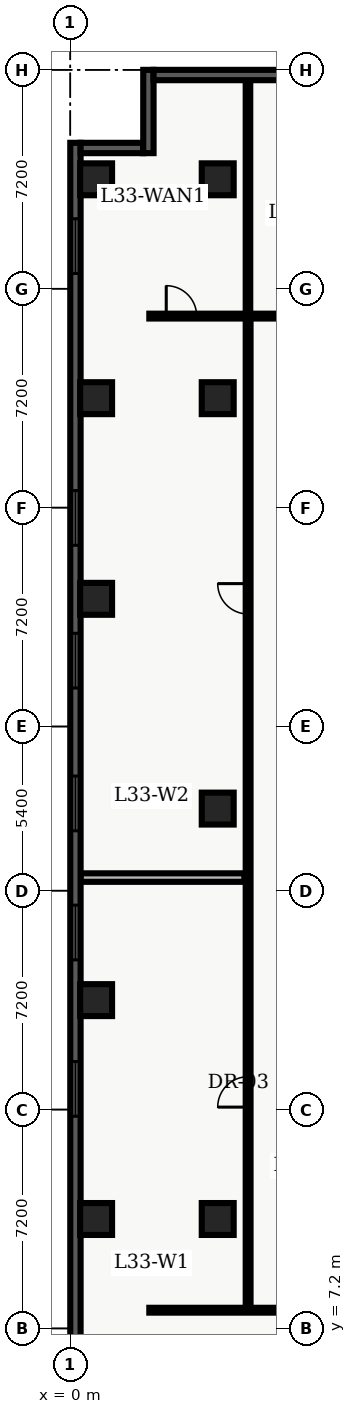
"""IFC4 building model, lengths in metres.
Left out: names, types, materials, properties, quantities, classifications, styles, units other than length and angle.
Written with IfcOpenShell. Run it as: python <this file> out.ifc"""

import sys

from ifc_helpers import new_model, entity, si_unit, converted_unit, direction, frame, origin_with_axes, origin_2d_with_axis, place, context, subcontext, project, spatial, polyline, rectangle, outline, extrude, element, fill, save


model = new_model("IFC4")
c1 = context("Model", 3, precision=1e-05, world=origin_with_axes(), true_north=direction((0.0, 1.0)))
c2 = subcontext(c1, "Body", "Model", "MODEL_VIEW")
j1 = project(units=[si_unit("LENGTHUNIT", "METRE"), converted_unit("PLANEANGLEUNIT", "DEGREE", entity("IfcPlaneAngleMeasure", 0.017), si_unit("PLANEANGLEUNIT", "RADIAN"), dimensions=[0, 0, 0, 0, 0, 0, 0])], contexts=[c1])
p1 = place(None, origin_with_axes())
s1 = spatial("IfcSite", under=j1, at=p1, CompositionType="ELEMENT")
p2 = place(p1, origin_with_axes())
s2 = spatial("IfcBuilding", under=s1, at=p2, CompositionType="ELEMENT")
p3 = place(p2, frame((0.0, 0.0, 136.8), z_axis=(0.0, 0.0, 1.0), x_axis=(1.0, 0.0, 0.0)))
s3 = spatial("IfcBuildingStorey", under=s2, at=p3, CompositionType="ELEMENT", Elevation=136.8)
for number, where, z_axis, x_axis in (
    (1, (4.85, 10.8, 0.0), (0.0, 0.0, 1.0), (1.0, 0.0, 0.0)),
    (2, (4.85, 24.3, 0.0), (0.0, 0.0, 1.0), (1.0, 0.0, 0.0)),
    (3, (4.85, 37.8, 0.0), (0.0, 0.0, 1.0), (1.0, 0.0, 0.0)),
    (4, (4.85, 45.0, 0.0), (0.0, 0.0, 1.0), (1.0, 0.0, 0.0)),
    (5, (0.85, 10.8, 0.0), (0.0, 0.0, 1.0), (1.0, 0.0, 0.0)),
    (6, (0.85, 18.0, 0.0), (0.0, 0.0, 1.0), (1.0, 0.0, 0.0)),
    (7, (0.85, 31.2, 0.0), (0.0, 0.0, 1.0), (1.0, 0.0, 0.0)),
    (8, (0.85, 37.8, 0.0), (0.0, 0.0, 1.0), (1.0, 0.0, 0.0)),
    (9, (0.85, 45.0, 0.0), (0.0, 0.0, 1.0), (1.0, 0.0, 0.0)),
):
    element("IfcColumn", number, at=place(p3, frame(where, z_axis=z_axis, x_axis=x_axis)), inside=s3, PredefinedType="COLUMN", context=c2, shape_type="SweptSolid", body=[
        extrude(rectangle(XDim=1.05, YDim=1.05, at=origin_2d_with_axis()), origin_with_axes(), (0.0, 0.0, 1.0), 3.9),
    ])
p4 = place(p3, frame((2.6, 7.8, 0.0), z_axis=(0.0, 0.0, 1.0), x_axis=(1.0, 0.0, 0.0)))
e10 = element("IfcWall", 10, at=p4, inside=s3, PredefinedType="PARTITIONING", context=c2, shape_type="SweptSolid", body=[
    extrude(outline(polyline([(0.0, -0.08), (18.55, -0.08), (18.55, 0.08), (0.0, 0.08), (0.0, -0.08)])), origin_with_axes(), (0.0, 0.0, 1.0), 2.7),
])
p5 = place(p4, frame((9.245, 0.0, 0.0), z_axis=(0.0, 0.0, 1.0), x_axis=(1.0, 0.0, 0.0)))
e11 = element("IfcOpeningElement", 11, at=p5, cuts=e10, PredefinedType="OPENING", context=c2, shape_type="SweptSolid", body=[
    extrude(rectangle(XDim=1.2, YDim=0.18, at=origin_2d_with_axis()), origin_with_axes(), (0.0, 0.0, 1.0), 2.2),
])
p6 = place(p3, frame((2.6, 40.5, 0.0), z_axis=(0.0, 0.0, 1.0), x_axis=(1.0, 0.0, 0.0)))
e12 = element("IfcWall", 12, at=p6, inside=s3, PredefinedType="PARTITIONING", context=c2, shape_type="SweptSolid", body=[
    extrude(outline(polyline([(0.0, -0.08), (18.89, -0.08), (18.89, 0.08), (0.0, 0.08), (0.0, -0.08)])), origin_with_axes(), (0.0, 0.0, 1.0), 2.7),
])
p7 = place(p6, frame((1.057, 0.0, 0.0), z_axis=(0.0, 0.0, 1.0), x_axis=(1.0, 0.0, 0.0)))
e13 = element("IfcOpeningElement", 13, at=p7, cuts=e12, PredefinedType="OPENING", context=c2, shape_type="SweptSolid", body=[
    extrude(rectangle(XDim=1.0, YDim=0.18, at=origin_2d_with_axis()), origin_with_axes(), (0.0, 0.0, 1.0), 2.15),
])
p8 = place(p6, frame((6.022, 0.0, 0.0), z_axis=(0.0, 0.0, 1.0), x_axis=(1.0, 0.0, 0.0)))
e14 = element("IfcOpeningElement", 14, at=p8, cuts=e12, PredefinedType="OPENING", context=c2, shape_type="SweptSolid", body=[
    extrude(rectangle(XDim=1.0, YDim=0.18, at=origin_2d_with_axis()), origin_with_axes(), (0.0, 0.0, 1.0), 2.15),
])
p9 = place(p6, frame((13.3, 0.0, 0.0), z_axis=(0.0, 0.0, 1.0), x_axis=(1.0, 0.0, 0.0)))
e15 = element("IfcOpeningElement", 15, at=p9, cuts=e12, PredefinedType="OPENING", context=c2, shape_type="SweptSolid", body=[
    extrude(rectangle(XDim=1.2, YDim=0.18, at=origin_2d_with_axis()), origin_with_axes(), (0.0, 0.0, 1.0), 2.2),
])
p10 = place(p3, frame((5.85, 7.8, 0.0), z_axis=(0.0, 0.0, 1.0), x_axis=(0.0, 1.0, 0.0)))
e16 = element("IfcWall", 16, at=p10, inside=s3, PredefinedType="PARTITIONING", context=c2, shape_type="SweptSolid", body=[
    extrude(outline(polyline([(0.0, -0.08), (32.7, -0.08), (32.7, 0.08), (0.0, 0.08), (0.0, -0.08)])), origin_with_axes(), (0.0, 0.0, 1.0), 2.7),
])
p11 = place(p10, frame((7.181, 0.0, 0.0), z_axis=(0.0, 0.0, 1.0), x_axis=(1.0, 0.0, 0.0)))
e17 = element("IfcOpeningElement", 17, at=p11, cuts=e16, PredefinedType="OPENING", context=c2, shape_type="SweptSolid", body=[
    extrude(rectangle(XDim=1.0, YDim=0.18, at=origin_2d_with_axis()), origin_with_axes(), (0.0, 0.0, 1.0), 2.15),
])
p12 = place(p10, frame((23.401, 0.0, 0.0), z_axis=(0.0, 0.0, 1.0), x_axis=(1.0, 0.0, 0.0)))
e18 = element("IfcOpeningElement", 18, at=p12, cuts=e16, PredefinedType="OPENING", context=c2, shape_type="SweptSolid", body=[
    extrude(rectangle(XDim=1.0, YDim=0.18, at=origin_2d_with_axis()), origin_with_axes(), (0.0, 0.0, 1.0), 2.15),
])
p13 = place(p3, frame((0.335, 22.031, 0.0), z_axis=(0.0, 0.0, 1.0), x_axis=(1.0, 0.0, 0.0)))
e19 = element("IfcWall", 19, at=p13, inside=s3, PredefinedType="PARTITIONING", context=c2, shape_type="SweptSolid", body=[
    extrude(outline(polyline([(0.0, -0.14), (5.395, -0.14), (5.395, 0.14), (0.0, 0.14), (0.0, -0.14)])), origin_with_axes(), (0.0, 0.0, 1.0), 2.7),
])
p14 = place(p3, frame((5.845, 40.6, 0.0), z_axis=(0.0, 0.0, 1.0), x_axis=(0.0, 1.0, 0.0)))
e20 = element("IfcWall", 20, at=p14, inside=s3, PredefinedType="PARTITIONING", context=c2, shape_type="SweptSolid", body=[
    extrude(outline(polyline([(0.0, -0.075), (7.665, -0.075), (7.665, 0.075), (0.0, 0.075), (0.0, -0.075)])), origin_with_axes(), (0.0, 0.0, 1.0), 2.7),
])
p15 = place(p3, frame((0.17, 2.74, 0.0), z_axis=(0.0, 0.0, 1.0), x_axis=(0.0, 1.0, 0.0)))
e21 = element("IfcWall", 21, at=p15, inside=s3, PredefinedType="SOLIDWALL", context=c2, shape_type="SweptSolid", body=[
    extrude(outline(polyline([(0.0, -0.17), (43.46, -0.17), (43.46, 0.17), (0.0, 0.17), (0.0, -0.17)])), origin_with_axes(), (0.0, 0.0, 1.0), 3.66),
])
p16 = place(p15, frame((2.948, 0.0, 0.45), z_axis=(0.0, 0.0, 1.0), x_axis=(1.0, 0.0, 0.0)))
e22 = element("IfcOpeningElement", 22, at=p16, cuts=e21, PredefinedType="OPENING", context=c2, shape_type="SweptSolid", body=[
    extrude(rectangle(XDim=1.8, YDim=0.36, at=origin_2d_with_axis()), origin_with_axes(), (0.0, 0.0, 1.0), 2.1),
])
p17 = place(p15, frame((12.339, 0.0, 0.45), z_axis=(0.0, 0.0, 1.0), x_axis=(1.0, 0.0, 0.0)))
e23 = element("IfcOpeningElement", 23, at=p17, cuts=e21, PredefinedType="OPENING", context=c2, shape_type="SweptSolid", body=[
    extrude(rectangle(XDim=1.8, YDim=0.36, at=origin_2d_with_axis()), origin_with_axes(), (0.0, 0.0, 1.0), 2.1),
])
p18 = place(p15, frame((17.484, 0.0, 0.45), z_axis=(0.0, 0.0, 1.0), x_axis=(1.0, 0.0, 0.0)))
e24 = element("IfcOpeningElement", 24, at=p18, cuts=e21, PredefinedType="OPENING", context=c2, shape_type="SweptSolid", body=[
    extrude(rectangle(XDim=1.8, YDim=0.36, at=origin_2d_with_axis()), origin_with_axes(), (0.0, 0.0, 1.0), 2.1),
])
p19 = place(p15, frame((21.73, 0.0, 0.45), z_axis=(0.0, 0.0, 1.0), x_axis=(1.0, 0.0, 0.0)))
e25 = element("IfcOpeningElement", 25, at=p19, cuts=e21, PredefinedType="OPENING", context=c2, shape_type="SweptSolid", body=[
    extrude(rectangle(XDim=1.8, YDim=0.36, at=origin_2d_with_axis()), origin_with_axes(), (0.0, 0.0, 1.0), 2.1),
])
p20 = place(p15, frame((26.426, 0.0, 0.45), z_axis=(0.0, 0.0, 1.0), x_axis=(1.0, 0.0, 0.0)))
e26 = element("IfcOpeningElement", 26, at=p20, cuts=e21, PredefinedType="OPENING", context=c2, shape_type="SweptSolid", body=[
    extrude(rectangle(XDim=1.8, YDim=0.36, at=origin_2d_with_axis()), origin_with_axes(), (0.0, 0.0, 1.0), 2.1),
])
p21 = place(p15, frame((31.121, 0.0, 0.45), z_axis=(0.0, 0.0, 1.0), x_axis=(1.0, 0.0, 0.0)))
e27 = element("IfcOpeningElement", 27, at=p21, cuts=e21, PredefinedType="OPENING", context=c2, shape_type="SweptSolid", body=[
    extrude(rectangle(XDim=1.8, YDim=0.36, at=origin_2d_with_axis()), origin_with_axes(), (0.0, 0.0, 1.0), 2.1),
])
p22 = place(p15, frame((40.062, 0.0, 0.45), z_axis=(0.0, 0.0, 1.0), x_axis=(1.0, 0.0, 0.0)))
e28 = element("IfcOpeningElement", 28, at=p22, cuts=e21, PredefinedType="OPENING", context=c2, shape_type="SweptSolid", body=[
    extrude(rectangle(XDim=1.8, YDim=0.36, at=origin_2d_with_axis()), origin_with_axes(), (0.0, 0.0, 1.0), 2.1),
])
p23 = place(p3, frame((0.34, 46.03, 0.0), z_axis=(0.0, 0.0, 1.0), x_axis=(1.0, 0.0, 0.0)))
e29 = element("IfcWall", 29, at=p23, inside=s3, PredefinedType="SOLIDWALL", context=c2, shape_type="SweptSolid", body=[
    extrude(outline(polyline([(0.0, -0.17), (2.06, -0.17), (2.06, 0.17), (0.0, 0.17), (0.0, -0.17)])), origin_with_axes(), (0.0, 0.0, 1.0), 3.66),
])
p24 = place(p3, frame((2.57, 45.86, 0.0), z_axis=(0.0, 0.0, 1.0), x_axis=(0.0, 1.0, 0.0)))
e30 = element("IfcWall", 30, at=p24, inside=s3, PredefinedType="SOLIDWALL", context=c2, shape_type="SweptSolid", body=[
    extrude(outline(polyline([(0.0, -0.17), (2.74, -0.17), (2.74, 0.17), (0.0, 0.17), (0.0, -0.17)])), origin_with_axes(), (0.0, 0.0, 1.0), 3.66),
])
p25 = place(p3, frame((2.74, 48.43, 0.0), z_axis=(0.0, 0.0, 1.0), x_axis=(1.0, 0.0, 0.0)))
e31 = element("IfcWall", 31, at=p25, inside=s3, PredefinedType="SOLIDWALL", context=c2, shape_type="SweptSolid", body=[
    extrude(outline(polyline([(0.0, -0.17), (17.045, -0.17), (17.045, 0.17), (0.0, 0.17), (0.0, -0.17)])), origin_with_axes(), (0.0, 0.0, 1.0), 3.66),
])
p26 = place(p25, frame((13.804, 0.0, 0.45), z_axis=(0.0, 0.0, 1.0), x_axis=(1.0, 0.0, 0.0)))
e32 = element("IfcOpeningElement", 32, at=p26, cuts=e31, PredefinedType="OPENING", context=c2, shape_type="SweptSolid", body=[
    extrude(rectangle(XDim=1.8, YDim=0.36, at=origin_2d_with_axis()), origin_with_axes(), (0.0, 0.0, 1.0), 2.1),
])
p27 = place(p10, frame((7.181, 0.0, 0.0), z_axis=(0.0, 0.0, 1.0), x_axis=(1.0, 0.0, 0.0)))
e33 = element("IfcDoor", 33, at=p27, inside=s3, OperationType="SINGLE_SWING_LEFT", PredefinedType="DOOR", context=c2, shape_type="SweptSolid", body=[
    extrude(rectangle(XDim=1.0, YDim=0.09, at=origin_2d_with_axis()), origin_with_axes(), (0.0, 0.0, 1.0), 2.15),
])
fill(e17, e33)
p28 = place(p10, frame((23.401, 0.0, 0.0), z_axis=(0.0, 0.0, 1.0), x_axis=(1.0, 0.0, 0.0)))
e34 = element("IfcDoor", 34, at=p28, inside=s3, OperationType="SINGLE_SWING_RIGHT", PredefinedType="DOOR", context=c2, shape_type="SweptSolid", body=[
    extrude(rectangle(XDim=1.0, YDim=0.09, at=origin_2d_with_axis()), origin_with_axes(), (0.0, 0.0, 1.0), 2.15),
])
fill(e18, e34)
p29 = place(p6, frame((1.057, 0.0, 0.0), z_axis=(0.0, 0.0, 1.0), x_axis=(1.0, 0.0, 0.0)))
e35 = element("IfcDoor", 35, at=p29, inside=s3, OperationType="SINGLE_SWING_LEFT", PredefinedType="DOOR", context=c2, shape_type="SweptSolid", body=[
    extrude(rectangle(XDim=1.0, YDim=0.09, at=origin_2d_with_axis()), origin_with_axes(), (0.0, 0.0, 1.0), 2.15),
])
fill(e13, e35)
p30 = place(p15, frame((12.339, 0.0, 0.45), z_axis=(0.0, 0.0, 1.0), x_axis=(1.0, 0.0, 0.0)))
e36 = element("IfcWindow", 36, at=p30, inside=s3, PredefinedType="WINDOW", context=c2, shape_type="SweptSolid", body=[
    extrude(rectangle(XDim=1.8, YDim=0.09, at=origin_2d_with_axis()), origin_with_axes(), (0.0, 0.0, 1.0), 2.1),
])
fill(e23, e36)
p31 = place(p15, frame((17.484, 0.0, 0.45), z_axis=(0.0, 0.0, 1.0), x_axis=(1.0, 0.0, 0.0)))
e37 = element("IfcWindow", 37, at=p31, inside=s3, PredefinedType="WINDOW", context=c2, shape_type="SweptSolid", body=[
    extrude(rectangle(XDim=1.8, YDim=0.09, at=origin_2d_with_axis()), origin_with_axes(), (0.0, 0.0, 1.0), 2.1),
])
fill(e24, e37)
p32 = place(p15, frame((21.73, 0.0, 0.45), z_axis=(0.0, 0.0, 1.0), x_axis=(1.0, 0.0, 0.0)))
e38 = element("IfcWindow", 38, at=p32, inside=s3, PredefinedType="WINDOW", context=c2, shape_type="SweptSolid", body=[
    extrude(rectangle(XDim=1.8, YDim=0.09, at=origin_2d_with_axis()), origin_with_axes(), (0.0, 0.0, 1.0), 2.1),
])
fill(e25, e38)
p33 = place(p15, frame((26.426, 0.0, 0.45), z_axis=(0.0, 0.0, 1.0), x_axis=(1.0, 0.0, 0.0)))
e39 = element("IfcWindow", 39, at=p33, inside=s3, PredefinedType="WINDOW", context=c2, shape_type="SweptSolid", body=[
    extrude(rectangle(XDim=1.8, YDim=0.09, at=origin_2d_with_axis()), origin_with_axes(), (0.0, 0.0, 1.0), 2.1),
])
fill(e26, e39)
p34 = place(p15, frame((31.121, 0.0, 0.45), z_axis=(0.0, 0.0, 1.0), x_axis=(1.0, 0.0, 0.0)))
e40 = element("IfcWindow", 40, at=p34, inside=s3, PredefinedType="WINDOW", context=c2, shape_type="SweptSolid", body=[
    extrude(rectangle(XDim=1.8, YDim=0.09, at=origin_2d_with_axis()), origin_with_axes(), (0.0, 0.0, 1.0), 2.1),
])
fill(e27, e40)
p35 = place(p15, frame((40.062, 0.0, 0.45), z_axis=(0.0, 0.0, 1.0), x_axis=(1.0, 0.0, 0.0)))
e41 = element("IfcWindow", 41, at=p35, inside=s3, PredefinedType="WINDOW", context=c2, shape_type="SweptSolid", body=[
    extrude(rectangle(XDim=1.8, YDim=0.09, at=origin_2d_with_axis()), origin_with_axes(), (0.0, 0.0, 1.0), 2.1),
])
fill(e28, e41)
save(model, sys.argv[1])
